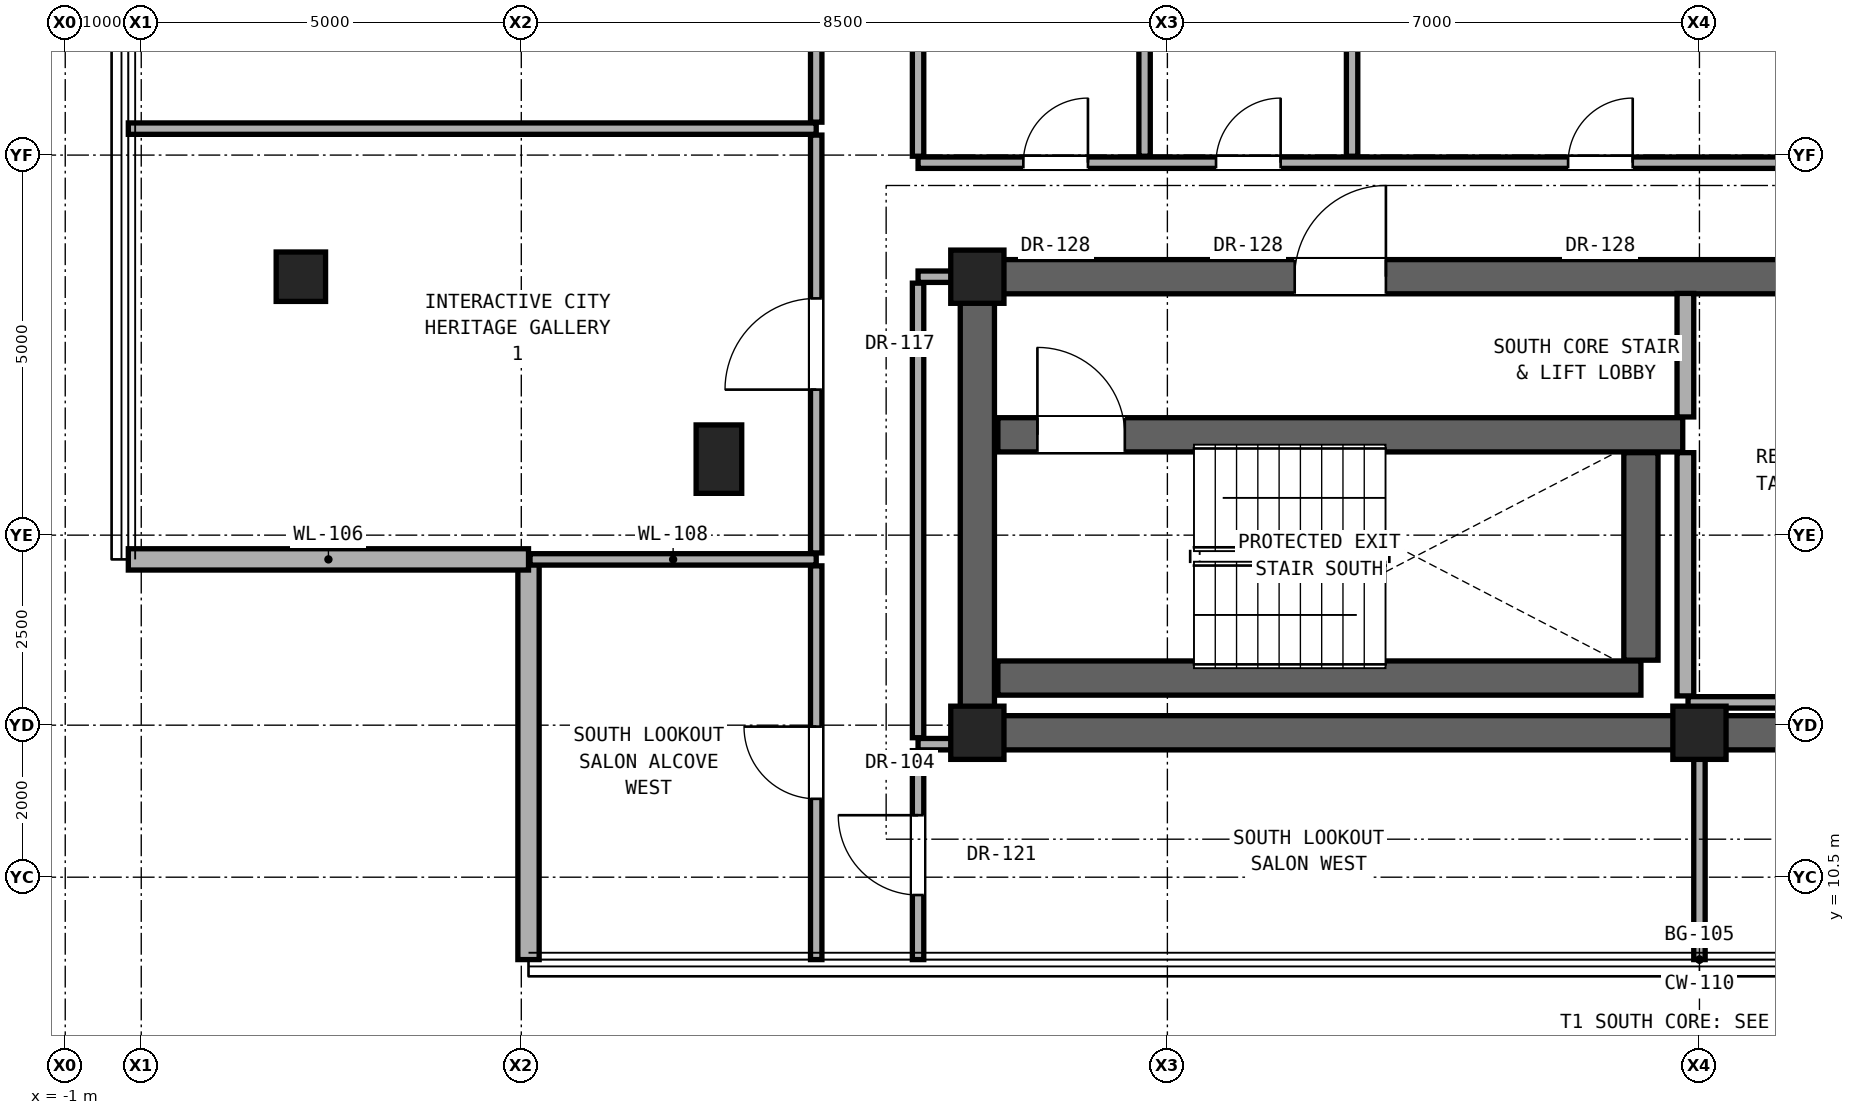
"""IFC4 building model, lengths in metres.
Left out: names, types, materials, properties, quantities, classifications, styles, units other than length and angle.
Written with IfcOpenShell. Run it as: python <this file> out.ifc"""

import sys

from ifc_helpers import new_model, si_unit, direction, frame, frame_2d, origin, origin_2d, place, context, subcontext, project, spatial, rectangle, hollow_rectangle, extrude, element, fill, save


model = new_model("IFC4")
c1 = context("Model", 3, precision=1e-05, world=origin(), true_north=direction((0.0, 1.0)))
c2 = subcontext(c1, "Body", "Model", "MODEL_VIEW")
j1 = project(units=[si_unit("LENGTHUNIT", "METRE"), si_unit("PLANEANGLEUNIT", "RADIAN")], contexts=[c1])
p1 = place(None, origin())
s1 = spatial("IfcSite", under=j1, at=p1, CompositionType="ELEMENT")
p2 = place(p1, origin())
s2 = spatial("IfcBuilding", under=s1, at=p2, CompositionType="ELEMENT")
p3 = place(p2, frame((0.0, 0.0, 259.9)))
s3 = spatial("IfcBuildingStorey", under=s2, at=p3, CompositionType="ELEMENT", Elevation=259.9)
for number, where, z_axis, x_axis in (
    (1, (11.0, 12.4, 0.0), (0.0, 0.0, 1.0), (1.0, 0.0, 0.0)),
    (2, (20.5, 12.4, 0.0), (0.0, 0.0, 1.0), (1.0, 0.0, 0.0)),
    (3, (11.0, 18.4, 0.0), (0.0, 0.0, 1.0), (1.0, 0.0, 0.0)),
):
    element("IfcColumn", number, at=place(p3, frame(where, z_axis=z_axis, x_axis=x_axis)), inside=s3, PredefinedType="COLUMN", context=c2, shape_type="SweptSolid", body=[
        extrude(rectangle(XDim=0.7, YDim=0.7, at=origin_2d()), origin(), (0.0, 0.0, 1.0), 3.6),
    ])
p4 = place(p3, frame((2.1, 18.4, 0.0), z_axis=(0.0, 0.0, 1.0), x_axis=(1.0, 0.0, 0.0)))
e4 = element("IfcColumn", 4, at=p4, inside=s3, PredefinedType="COLUMN", context=c2, shape_type="SweptSolid", body=[
    extrude(hollow_rectangle(XDim=0.65, YDim=0.65, WallThickness=0.036, at=origin_2d()), origin(), (0.0, 0.0, 1.0), 3.6),
])
p5 = place(p3, frame((7.6, 16.0, 0.0), z_axis=(0.0, 0.0, 1.0), x_axis=(1.0, 0.0, 0.0)))
e5 = element("IfcColumn", 5, at=p5, inside=s3, PredefinedType="PILASTER", context=c2, shape_type="SweptSolid", body=[
    extrude(rectangle(XDim=0.6, YDim=0.9, at=origin_2d()), origin(), (0.0, 0.0, 1.0), 3.6),
])
p6 = place(p3, frame((11.0, 12.4, 0.0), z_axis=(0.0, 0.0, 1.0), x_axis=(1.0, 0.0, 0.0)))
e6 = element("IfcWall", 6, at=p6, inside=s3, PredefinedType="SHEAR", context=c2, shape_type="SweptSolid", body=[
    extrude(rectangle(XDim=19.0, YDim=0.45, at=frame_2d((9.5, 0.0))), origin(), (0.0, 0.0, 1.0), 2.95),
])
p7 = place(p3, frame((11.0, 12.4, 0.0), z_axis=(0.0, 0.0, 1.0), x_axis=(0.0, 1.0, 0.0)))
e7 = element("IfcWall", 7, at=p7, inside=s3, PredefinedType="SHEAR", context=c2, shape_type="SweptSolid", body=[
    extrude(rectangle(XDim=6.0, YDim=0.45, at=frame_2d((3.0, 0.0))), origin(), (0.0, 0.0, 1.0), 2.95),
])
p8 = place(p3, frame((11.0, 18.4, 0.0), z_axis=(0.0, 0.0, 1.0), x_axis=(1.0, 0.0, 0.0)))
e8 = element("IfcWall", 8, at=p8, inside=s3, PredefinedType="SHEAR", context=c2, shape_type="SweptSolid", body=[
    extrude(rectangle(XDim=19.0, YDim=0.45, at=frame_2d((9.5, 0.0))), origin(), (0.0, 0.0, 1.0), 2.95),
])
p9 = place(p8, frame((4.175, 0.0, 0.0)))
e9 = element("IfcOpeningElement", 9, at=p9, cuts=e8, PredefinedType="OPENING", context=c2, shape_type="SweptSolid", body=[
    extrude(rectangle(XDim=1.2, YDim=2.25, at=frame_2d((0.6, 1.125))), frame((0.0, 0.235, 0.0), z_axis=(0.0, -1.0, 0.0), x_axis=(1.0, 0.0, 0.0)), (0.0, 0.0, 1.0), 0.47),
])
p10 = place(p8, frame((11.075, 0.0, 0.0)))
e10 = element("IfcOpeningElement", 10, at=p10, cuts=e8, PredefinedType="OPENING", context=c2, shape_type="SweptSolid", body=[
    extrude(rectangle(XDim=0.95, YDim=2.15, at=frame_2d((0.475, 1.075))), frame((0.0, 0.235, 0.0), z_axis=(0.0, -1.0, 0.0), x_axis=(1.0, 0.0, 0.0)), (0.0, 0.0, 1.0), 0.47),
])
p11 = place(p8, frame((14.3, 0.0, 0.0)))
e11 = element("IfcOpeningElement", 11, at=p11, cuts=e8, PredefinedType="OPENING", context=c2, shape_type="SweptSolid", body=[
    extrude(rectangle(XDim=1.3, YDim=2.3, at=frame_2d((0.65, 1.15))), frame((0.0, 0.235, 0.0), z_axis=(0.0, -1.0, 0.0), x_axis=(1.0, 0.0, 0.0)), (0.0, 0.0, 1.0), 0.47),
])
p12 = place(p8, frame((16.6, 0.0, 0.0)))
e12 = element("IfcOpeningElement", 12, at=p12, cuts=e8, PredefinedType="OPENING", context=c2, shape_type="SweptSolid", body=[
    extrude(rectangle(XDim=1.3, YDim=2.3, at=frame_2d((0.65, 1.15))), frame((0.0, 0.235, 0.0), z_axis=(0.0, -1.0, 0.0), x_axis=(1.0, 0.0, 0.0)), (0.0, 0.0, 1.0), 0.47),
])
for number, where, z_axis, x_axis in (
    (13, (5.095, 14.681, 0.0), (0.0, 0.0, 1.0), (0.0, -1.0, 0.0)),
    (14, (-0.17, 14.681, 0.0), (0.0, 0.0, 1.0), (1.0, 0.0, 0.0)),
):
    element("IfcWall", number, at=place(p3, frame(where, z_axis=z_axis, x_axis=x_axis)), inside=s3, PredefinedType="SOLIDWALL", context=c2, shape_type="SweptSolid", body=[
        extrude(rectangle(XDim=5.265, YDim=0.28, at=frame_2d((2.632, 0.0))), origin(), (0.0, 0.0, 1.0), 2.93),
    ])
p13 = place(p3, frame((10.22, 12.25, 0.0), z_axis=(0.0, 0.0, 1.0), x_axis=(1.0, 0.0, 0.0)))
e15 = element("IfcWall", 15, at=p13, inside=s3, PredefinedType="PARTITIONING", context=c2, shape_type="SweptSolid", body=[
    extrude(rectangle(XDim=0.56, YDim=0.15, at=frame_2d((0.28, 0.0))), origin(), (0.0, 0.0, 1.0), 2.95),
])
p14 = place(p3, frame((20.35, 12.8, 0.0), z_axis=(0.0, 0.0, 1.0), x_axis=(1.0, 0.0, 0.0)))
e16 = element("IfcWall", 16, at=p14, inside=s3, PredefinedType="PARTITIONING", context=c2, shape_type="SweptSolid", body=[
    extrude(rectangle(XDim=8.9, YDim=0.15, at=frame_2d((4.45, 0.0))), origin(), (0.0, 0.0, 1.0), 2.95),
])
p15 = place(p3, frame((11.27, 13.12, 0.0), z_axis=(0.0, 0.0, 1.0), x_axis=(1.0, 0.0, 0.0)))
e17 = element("IfcWall", 17, at=p15, inside=s3, PredefinedType="SHEAR", context=c2, shape_type="SweptSolid", body=[
    extrude(rectangle(XDim=8.46, YDim=0.45, at=frame_2d((4.23, 0.0))), origin(), (0.0, 0.0, 1.0), 2.95),
])
p16 = place(p3, frame((5.115, 14.681, 0.0), z_axis=(0.0, 0.0, 1.0), x_axis=(1.0, 0.0, 0.0)))
e18 = element("IfcWall", 18, at=p16, inside=s3, PredefinedType="PARTITIONING", context=c2, shape_type="SweptSolid", body=[
    extrude(rectangle(XDim=3.765, YDim=0.15, at=frame_2d((1.882, 0.0))), origin(), (0.0, 0.0, 1.0), 2.95),
])
p17 = place(p3, frame((11.27, 16.32, 0.0), z_axis=(0.0, 0.0, 1.0), x_axis=(1.0, 0.0, 0.0)))
e19 = element("IfcWall", 19, at=p17, inside=s3, PredefinedType="SHEAR", context=c2, shape_type="SweptSolid", body=[
    extrude(rectangle(XDim=9.01, YDim=0.45, at=frame_2d((4.505, 0.0))), origin(), (0.0, 0.0, 1.0), 2.95),
])
p18 = place(p17, frame((0.52, 0.0, 0.0)))
e20 = element("IfcOpeningElement", 20, at=p18, cuts=e19, PredefinedType="OPENING", context=c2, shape_type="SweptSolid", body=[
    extrude(rectangle(XDim=1.15, YDim=2.2, at=frame_2d((0.575, 1.1))), frame((0.0, 0.235, 0.0), z_axis=(0.0, -1.0, 0.0), x_axis=(1.0, 0.0, 0.0)), (0.0, 0.0, 1.0), 0.47),
])
p19 = place(p3, frame((10.22, 18.4, 0.0), z_axis=(0.0, 0.0, 1.0), x_axis=(1.0, 0.0, 0.0)))
e21 = element("IfcWall", 21, at=p19, inside=s3, PredefinedType="PARTITIONING", context=c2, shape_type="SweptSolid", body=[
    extrude(rectangle(XDim=0.56, YDim=0.15, at=frame_2d((0.28, 0.0))), origin(), (0.0, 0.0, 1.0), 2.393),
])
p20 = place(p3, frame((10.22, 19.9, 0.0), z_axis=(0.0, 0.0, 1.0), x_axis=(1.0, 0.0, 0.0)))
e22 = element("IfcWall", 22, at=p20, inside=s3, PredefinedType="PARTITIONING", context=c2, shape_type="SweptSolid", body=[
    extrude(rectangle(XDim=20.56, YDim=0.15, at=frame_2d((10.28, 0.0))), origin(), (0.0, 0.0, 1.0), 2.086),
])
p21 = place(p20, frame((1.385, 0.0, 0.0)))
e23 = element("IfcOpeningElement", 23, at=p21, cuts=e22, PredefinedType="OPENING", context=c2, shape_type="SweptSolid", body=[
    extrude(rectangle(XDim=0.85, YDim=2.01, at=frame_2d((0.425, 1.005))), frame((0.0, 0.085, 0.0), z_axis=(0.0, -1.0, 0.0), x_axis=(1.0, 0.0, 0.0)), (0.0, 0.0, 1.0), 0.17),
])
p22 = place(p20, frame((3.92, 0.0, 0.0)))
e24 = element("IfcOpeningElement", 24, at=p22, cuts=e22, PredefinedType="OPENING", context=c2, shape_type="SweptSolid", body=[
    extrude(rectangle(XDim=0.85, YDim=2.01, at=frame_2d((0.425, 1.005))), frame((0.0, 0.085, 0.0), z_axis=(0.0, -1.0, 0.0), x_axis=(1.0, 0.0, 0.0)), (0.0, 0.0, 1.0), 0.17),
])
p23 = place(p20, frame((8.552, 0.0, 0.0)))
e25 = element("IfcOpeningElement", 25, at=p23, cuts=e22, PredefinedType="OPENING", context=c2, shape_type="SweptSolid", body=[
    extrude(rectangle(XDim=0.85, YDim=2.01, at=frame_2d((0.425, 1.005))), frame((0.0, 0.085, 0.0), z_axis=(0.0, -1.0, 0.0), x_axis=(1.0, 0.0, 0.0)), (0.0, 0.0, 1.0), 0.17),
])
p24 = place(p3, frame((-0.17, 20.348, 0.0), z_axis=(0.0, 0.0, 1.0), x_axis=(1.0, 0.0, 0.0)))
e26 = element("IfcWall", 26, at=p24, inside=s3, PredefinedType="PARTITIONING", context=c2, shape_type="SweptSolid", body=[
    extrude(rectangle(XDim=9.05, YDim=0.15, at=frame_2d((4.525, 0.0))), origin(), (0.0, 0.0, 1.0), 2.169),
])
p25 = place(p3, frame((8.88, 9.416, 0.0), z_axis=(0.0, 0.0, 1.0), x_axis=(0.0, 1.0, 0.0)))
e27 = element("IfcWall", 27, at=p25, inside=s3, PredefinedType="PARTITIONING", context=c2, shape_type="SweptSolid", body=[
    extrude(rectangle(XDim=5.18, YDim=0.15, at=frame_2d((2.59, 0.0))), origin(), (0.0, 0.0, 1.0), 2.95),
])
p26 = place(p25, frame((2.115, 0.0, 0.0)))
e28 = element("IfcOpeningElement", 28, at=p26, cuts=e27, PredefinedType="OPENING", context=c2, shape_type="SweptSolid", body=[
    extrude(rectangle(XDim=0.95, YDim=2.15, at=frame_2d((0.475, 1.075))), frame((0.0, 0.085, 0.0), z_axis=(0.0, -1.0, 0.0), x_axis=(1.0, 0.0, 0.0)), (0.0, 0.0, 1.0), 0.17),
])
p27 = place(p3, frame((8.88, 14.766, 0.0), z_axis=(0.0, 0.0, 1.0), x_axis=(0.0, 1.0, 0.0)))
e29 = element("IfcWall", 29, at=p27, inside=s3, PredefinedType="PARTITIONING", context=c2, shape_type="SweptSolid", body=[
    extrude(rectangle(XDim=5.497, YDim=0.15, at=frame_2d((2.749, 0.0))), origin(), (0.0, 0.0, 1.0), 2.393),
])
p28 = place(p27, frame((2.148, 0.0, 0.0)))
e30 = element("IfcOpeningElement", 30, at=p28, cuts=e29, PredefinedType="OPENING", context=c2, shape_type="SweptSolid", body=[
    extrude(rectangle(XDim=1.2, YDim=2.25, at=frame_2d((0.6, 1.125))), frame((0.0, 0.085, 0.0), z_axis=(0.0, -1.0, 0.0), x_axis=(1.0, 0.0, 0.0)), (0.0, 0.0, 1.0), 0.17),
])
p29 = place(p3, frame((8.88, 20.433, 0.0), z_axis=(0.0, 0.0, 1.0), x_axis=(0.0, 1.0, 0.0)))
e31 = element("IfcWall", 31, at=p29, inside=s3, PredefinedType="PARTITIONING", context=c2, shape_type="SweptSolid", body=[
    extrude(rectangle(XDim=4.282, YDim=0.15, at=frame_2d((2.141, 0.0))), origin(), (0.0, 0.0, 1.0), 2.246),
])
p30 = place(p29, frame((1.616, 0.0, 0.0)))
e32 = element("IfcOpeningElement", 32, at=p30, cuts=e31, PredefinedType="OPENING", context=c2, shape_type="SweptSolid", body=[
    extrude(rectangle(XDim=1.05, YDim=2.2, at=frame_2d((0.525, 1.1))), frame((0.0, 0.085, 0.0), z_axis=(0.0, -1.0, 0.0), x_axis=(1.0, 0.0, 0.0)), (0.0, 0.0, 1.0), 0.17),
])
p31 = place(p3, frame((10.22, 9.416, 0.0), z_axis=(0.0, 0.0, 1.0), x_axis=(0.0, 1.0, 0.0)))
e33 = element("IfcWall", 33, at=p31, inside=s3, PredefinedType="PARTITIONING", context=c2, shape_type="SweptSolid", body=[
    extrude(rectangle(XDim=2.749, YDim=0.15, at=frame_2d((1.375, 0.0))), origin(), (0.0, 0.0, 1.0), 2.95),
])
p32 = place(p31, frame((0.85, 0.0, 0.0)))
e34 = element("IfcOpeningElement", 34, at=p32, cuts=e33, PredefinedType="OPENING", context=c2, shape_type="SweptSolid", body=[
    extrude(rectangle(XDim=1.05, YDim=2.2, at=frame_2d((0.525, 1.1))), frame((0.0, 0.085, 0.0), z_axis=(0.0, -1.0, 0.0), x_axis=(1.0, 0.0, 0.0)), (0.0, 0.0, 1.0), 0.17),
])
p33 = place(p3, frame((10.22, 12.335, 0.0), z_axis=(0.0, 0.0, 1.0), x_axis=(0.0, 1.0, 0.0)))
e35 = element("IfcWall", 35, at=p33, inside=s3, PredefinedType="PARTITIONING", context=c2, shape_type="SweptSolid", body=[
    extrude(rectangle(XDim=5.98, YDim=0.15, at=frame_2d((2.99, 0.0))), origin(), (0.0, 0.0, 1.0), 2.393),
])
for number, where, z_axis, x_axis in (
    (36, (10.22, 19.985, 0.0), (0.0, 0.0, 1.0), (0.0, 1.0, 0.0)),
    (37, (13.2, 19.985, 0.0), (0.0, 0.0, 1.0), (0.0, 1.0, 0.0)),
    (38, (15.93, 19.985, 0.0), (0.0, 0.0, 1.0), (0.0, 1.0, 0.0)),
):
    element("IfcWall", number, at=place(p3, frame(where, z_axis=z_axis, x_axis=x_axis)), inside=s3, PredefinedType="PARTITIONING", context=c2, shape_type="SweptSolid", body=[
        extrude(rectangle(XDim=2.78, YDim=0.15, at=frame_2d((1.39, 0.0))), origin(), (0.0, 0.0, 1.0), 2.95),
    ])
p34 = place(p3, frame((19.73, 13.355, 0.0), z_axis=(0.0, 0.0, 1.0), x_axis=(0.0, 1.0, 0.0)))
e39 = element("IfcWall", 39, at=p34, inside=s3, PredefinedType="SHEAR", context=c2, shape_type="SweptSolid", body=[
    extrude(rectangle(XDim=2.73, YDim=0.45, at=frame_2d((1.365, 0.0))), origin(), (0.0, 0.0, 1.0), 2.95),
])
p35 = place(p3, frame((20.315, 12.885, 0.0), z_axis=(0.0, 0.0, 1.0), x_axis=(0.0, 1.0, 0.0)))
e40 = element("IfcWall", 40, at=p35, inside=s3, PredefinedType="SOLIDWALL", context=c2, shape_type="SweptSolid", body=[
    extrude(rectangle(XDim=3.2, YDim=0.22, at=frame_2d((1.6, 0.0))), origin(), (0.0, 0.0, 1.0), 2.95),
])
p36 = place(p3, frame((20.315, 16.555, 0.0), z_axis=(0.0, 0.0, 1.0), x_axis=(0.0, 1.0, 0.0)))
e41 = element("IfcWall", 41, at=p36, inside=s3, PredefinedType="SOLIDWALL", context=c2, shape_type="SweptSolid", body=[
    extrude(rectangle(XDim=1.625, YDim=0.22, at=frame_2d((0.812, 0.0))), origin(), (0.0, 0.0, 1.0), 2.95),
])
p37 = place(p3, frame((20.5, 9.416, 0.0), z_axis=(0.0, 0.0, 1.0), x_axis=(0.0, 1.0, 0.0)))
e42 = element("IfcWall", 42, at=p37, inside=s3, PredefinedType="PARTITIONING", context=c2, shape_type="SweptSolid", body=[
    extrude(rectangle(XDim=2.764, YDim=0.15, at=frame_2d((1.382, 0.0))), origin(), (0.0, 0.0, 1.0), 2.95),
])
p38 = place(p9, origin())
e43 = element("IfcDoor", 43, at=p38, inside=s3, OperationType="SINGLE_SWING_RIGHT", PredefinedType="DOOR", context=c2, shape_type="SweptSolid", body=[
    extrude(rectangle(XDim=1.2, YDim=2.25, at=frame_2d((0.6, 1.125))), frame((0.0, 0.025, 0.0), z_axis=(0.0, -1.0, 0.0), x_axis=(1.0, 0.0, 0.0)), (0.0, 0.0, 1.0), 0.05),
])
fill(e9, e43)
p39 = place(p18, origin())
e44 = element("IfcDoor", 44, at=p39, inside=s3, OperationType="SINGLE_SWING_LEFT", PredefinedType="DOOR", context=c2, shape_type="SweptSolid", body=[
    extrude(rectangle(XDim=1.15, YDim=2.2, at=frame_2d((0.575, 1.1))), frame((0.0, 0.025, 0.0), z_axis=(0.0, -1.0, 0.0), x_axis=(1.0, 0.0, 0.0)), (0.0, 0.0, 1.0), 0.05),
])
fill(e20, e44)
p40 = place(p21, origin())
e45 = element("IfcDoor", 45, at=p40, inside=s3, OperationType="SINGLE_SWING_RIGHT", PredefinedType="DOOR", context=c2, shape_type="SweptSolid", body=[
    extrude(rectangle(XDim=0.85, YDim=2.01, at=frame_2d((0.425, 1.005))), frame((0.0, 0.025, 0.0), z_axis=(0.0, -1.0, 0.0), x_axis=(1.0, 0.0, 0.0)), (0.0, 0.0, 1.0), 0.05),
])
fill(e23, e45)
p41 = place(p28, origin())
e46 = element("IfcDoor", 46, at=p41, inside=s3, OperationType="SINGLE_SWING_LEFT", PredefinedType="DOOR", context=c2, shape_type="SweptSolid", body=[
    extrude(rectangle(XDim=1.2, YDim=2.25, at=frame_2d((0.6, 1.125))), frame((0.0, 0.025, 0.0), z_axis=(0.0, -1.0, 0.0), x_axis=(1.0, 0.0, 0.0)), (0.0, 0.0, 1.0), 0.05),
])
fill(e30, e46)
p42 = place(p22, origin())
e47 = element("IfcDoor", 47, at=p42, inside=s3, OperationType="SINGLE_SWING_RIGHT", PredefinedType="DOOR", context=c2, shape_type="SweptSolid", body=[
    extrude(rectangle(XDim=0.85, YDim=2.01, at=frame_2d((0.425, 1.005))), frame((0.0, 0.025, 0.0), z_axis=(0.0, -1.0, 0.0), x_axis=(1.0, 0.0, 0.0)), (0.0, 0.0, 1.0), 0.05),
])
fill(e24, e47)
p43 = place(p23, origin())
e48 = element("IfcDoor", 48, at=p43, inside=s3, OperationType="SINGLE_SWING_RIGHT", PredefinedType="DOOR", context=c2, shape_type="SweptSolid", body=[
    extrude(rectangle(XDim=0.85, YDim=2.01, at=frame_2d((0.425, 1.005))), frame((0.0, 0.025, 0.0), z_axis=(0.0, -1.0, 0.0), x_axis=(1.0, 0.0, 0.0)), (0.0, 0.0, 1.0), 0.05),
])
fill(e25, e48)
p44 = place(p32, origin())
e49 = element("IfcDoor", 49, at=p44, inside=s3, OperationType="SINGLE_SWING_RIGHT", PredefinedType="DOOR", context=c2, shape_type="SweptSolid", body=[
    extrude(rectangle(XDim=1.05, YDim=2.2, at=frame_2d((0.525, 1.1))), frame((0.0, 0.025, 0.0), z_axis=(0.0, -1.0, 0.0), x_axis=(1.0, 0.0, 0.0)), (0.0, 0.0, 1.0), 0.05),
])
fill(e34, e49)
p45 = place(p26, origin())
e50 = element("IfcDoor", 50, at=p45, inside=s3, OperationType="SINGLE_SWING_RIGHT", PredefinedType="DOOR", context=c2, shape_type="SweptSolid", body=[
    extrude(rectangle(XDim=0.95, YDim=2.15, at=frame_2d((0.475, 1.075))), frame((0.0, 0.025, 0.0), z_axis=(0.0, -1.0, 0.0), x_axis=(1.0, 0.0, 0.0)), (0.0, 0.0, 1.0), 0.05),
])
fill(e28, e50)
save(model, sys.argv[1])
